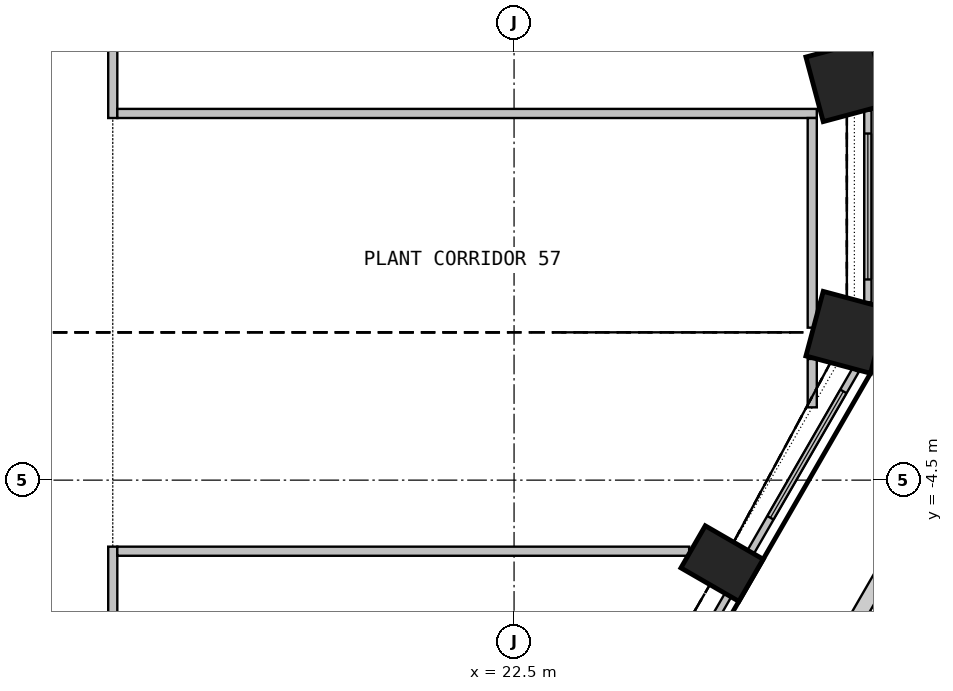
"""IFC4 building model, lengths in metres.
Left out: names, types, materials, properties, quantities, classifications, styles, units other than length and angle.
Written with IfcOpenShell. Run it as: python <this file> out.ifc"""

import sys

from ifc_helpers import new_model, si_unit, direction, frame, frame_2d, origin, origin_2d, place, context, subcontext, project, spatial, polyline, rectangle, outline, extrude, element, fill, save


model = new_model("IFC4")
c1 = context("Model", 3, precision=1e-05, world=origin(), true_north=direction((0.0, 1.0)))
c2 = subcontext(c1, "Body", "Model", "MODEL_VIEW")
j1 = project(units=[si_unit("LENGTHUNIT", "METRE"), si_unit("PLANEANGLEUNIT", "RADIAN")], contexts=[c1])
p1 = place(None, origin())
s1 = spatial("IfcSite", under=j1, at=p1, CompositionType="ELEMENT")
p2 = place(p1, origin())
s2 = spatial("IfcBuilding", under=s1, at=p2, CompositionType="ELEMENT")
p3 = place(p2, frame((0.0, 0.0, 230.7)))
s3 = spatial("IfcBuildingStorey", under=s2, at=p3, CompositionType="ELEMENT", Elevation=230.7)
p4 = place(p3, frame((25.921, -5.872, 0.0), z_axis=(0.0, 0.0, 1.0), x_axis=(0.5, 0.866025403784, 0.0)))
e1 = element("IfcColumn", 1, at=p4, inside=s3, PredefinedType="COLUMN", context=c2, shape_type="SweptSolid", body=[
    extrude(rectangle(XDim=0.8, YDim=1.1, at=origin_2d()), origin(), (0.0, 0.0, 1.0), 4.175),
])
for number, where, z_axis, x_axis in (
    (2, (27.973, -2.07, 0.0), (0.0, 0.0, 1.0), (0.259, 0.966, 0.0)),
    (3, (27.973, 2.07, 0.0), (0.0, 0.0, 1.0), (-0.259, 0.966, 0.0)),
):
    element("IfcColumn", number, at=place(p3, frame(where, z_axis=z_axis, x_axis=x_axis)), inside=s3, PredefinedType="COLUMN", context=c2, shape_type="SweptSolid", body=[
        extrude(rectangle(XDim=1.1, YDim=1.1, at=origin_2d()), origin(), (0.0, 0.0, 1.0), 4.175),
    ])
p5 = place(p3, frame((24.17, -9.595, 0.0), z_axis=(0.0, 0.0, 1.0), x_axis=(0.500029062817, 0.866008623709, 0.0)))
e4 = element("IfcWall", 4, at=p5, inside=s3, PredefinedType="SOLIDWALL", context=c2, shape_type="SweptSolid", body=[
    extrude(rectangle(XDim=3.699, YDim=0.12, at=frame_2d((1.85, 0.0))), origin(), (0.0, 0.0, 1.0), 4.175),
])
p6 = place(p5, frame((0.649, 0.0, 0.6)))
e5 = element("IfcOpeningElement", 5, at=p6, cuts=e4, PredefinedType="OPENING", context=c2, shape_type="SweptSolid", body=[
    extrude(rectangle(XDim=2.4, YDim=3.0, at=frame_2d((1.2, 1.5))), frame((0.0, 0.07, 0.0), z_axis=(0.0, -1.0, 0.0), x_axis=(1.0, 0.0, 0.0)), (0.0, 0.0, 1.0), 0.14),
])
p7 = place(p3, frame((26.392, -5.681, 0.0), z_axis=(0.0, 0.0, 1.0), x_axis=(0.500020560727, 0.866013532718, 0.0)))
e6 = element("IfcWall", 6, at=p7, inside=s3, PredefinedType="SOLIDWALL", context=c2, shape_type="SweptSolid", body=[
    extrude(rectangle(XDim=3.45, YDim=0.12, at=frame_2d((1.725, 0.0))), origin(), (0.0, 0.0, 1.0), 4.175),
])
p8 = place(p7, frame((0.649, 0.0, 0.6)))
e7 = element("IfcOpeningElement", 7, at=p8, cuts=e6, PredefinedType="OPENING", context=c2, shape_type="SweptSolid", body=[
    extrude(rectangle(XDim=2.4, YDim=3.0, at=frame_2d((1.2, 1.5))), frame((0.0, 0.07, 0.0), z_axis=(0.0, -1.0, 0.0), x_axis=(1.0, 0.0, 0.0)), (0.0, 0.0, 1.0), 0.14),
])
p9 = place(p3, frame((28.319, -1.576, 0.0), z_axis=(0.0, 0.0, 1.0), x_axis=(0.0, 1.0, 0.0)))
e8 = element("IfcWall", 8, at=p9, inside=s3, PredefinedType="SOLIDWALL", context=c2, shape_type="SweptSolid", body=[
    extrude(rectangle(XDim=3.153, YDim=0.12, at=frame_2d((1.576, 0.0))), origin(), (0.0, 0.0, 1.0), 4.175),
])
p10 = place(p9, frame((0.376, 0.0, 0.6)))
e9 = element("IfcOpeningElement", 9, at=p10, cuts=e8, PredefinedType="OPENING", context=c2, shape_type="SweptSolid", body=[
    extrude(rectangle(XDim=2.4, YDim=3.0, at=frame_2d((1.2, 1.5))), frame((0.0, 0.07, 0.0), z_axis=(0.0, -1.0, 0.0), x_axis=(1.0, 0.0, 0.0)), (0.0, 0.0, 1.0), 0.14),
])
p11 = place(p3, origin())
e10 = element("IfcWall", 10, at=p11, inside=s3, PredefinedType="PARAPET", context=c2, shape_type="SweptSolid", body=[
    extrude(outline(polyline([(26.397, -10.044), (28.647, -6.147), (28.431, -6.022), (26.181, -9.919), (26.397, -10.044)])), origin(), (0.0, 0.0, 1.0), 1.1),
])
p12 = place(p3, frame((15.9, -13.575, 0.0), z_axis=(0.0, 0.0, 1.0), x_axis=(0.0, 1.0, 0.0)))
e11 = element("IfcWall", 11, at=p12, inside=s3, PredefinedType="PARTITIONING", context=c2, shape_type="SweptSolid", body=[
    extrude(rectangle(XDim=7.981, YDim=0.15, at=frame_2d((3.99, 0.0))), origin(), (0.0, 0.0, 1.0), 4.175),
])
p13 = place(p3, frame((25.38, -5.669, 0.0), z_axis=(0.0, 0.0, 1.0), x_axis=(-1.0, 0.0, 0.0)))
e12 = element("IfcWall", 12, at=p13, inside=s3, PredefinedType="PARTITIONING", context=c2, shape_type="SweptSolid", body=[
    extrude(rectangle(XDim=9.405, YDim=0.15, at=frame_2d((4.702, 0.0))), origin(), (0.0, 0.0, 1.0), 4.175),
])
p14 = place(p3, frame((15.9, 1.455, 0.0), z_axis=(0.0, 0.0, 1.0), x_axis=(0.0, 1.0, 0.0)))
e13 = element("IfcWall", 13, at=p14, inside=s3, PredefinedType="PARTITIONING", context=c2, shape_type="SweptSolid", body=[
    extrude(rectangle(XDim=12.12, YDim=0.15, at=frame_2d((6.06, 0.0))), origin(), (0.0, 0.0, 1.0), 4.175),
])
p15 = place(p3, frame((15.975, 1.53, 0.0), z_axis=(0.0, 0.0, 1.0), x_axis=(1.0, 0.0, 0.0)))
e14 = element("IfcWall", 14, at=p15, inside=s3, PredefinedType="PARTITIONING", context=c2, shape_type="SweptSolid", body=[
    extrude(rectangle(XDim=11.504, YDim=0.15, at=frame_2d((5.752, 0.0))), origin(), (0.0, 0.0, 1.0), 4.175),
])
p16 = place(p3, frame((27.404, 1.455, 0.0), z_axis=(0.0, 0.0, 1.0), x_axis=(0.0, -1.0, 0.0)))
e15 = element("IfcWall", 15, at=p16, inside=s3, PredefinedType="PARTITIONING", context=c2, shape_type="SweptSolid", body=[
    extrude(rectangle(XDim=3.448, YDim=0.15, at=frame_2d((1.724, 0.0))), origin(), (0.0, 0.0, 1.0), 4.175),
])
p17 = place(p3, frame((27.404, -2.507, 0.0), z_axis=(0.0, 0.0, 1.0), x_axis=(0.0, -1.0, 0.0)))
e16 = element("IfcWall", 16, at=p17, inside=s3, PredefinedType="PARTITIONING", context=c2, shape_type="SweptSolid", body=[
    extrude(rectangle(XDim=0.796, YDim=0.15, at=frame_2d((0.398, 0.0))), origin(), (0.0, 0.0, 1.0), 4.175),
])
p18 = place(p8, origin())
e17 = element("IfcWindow", 17, at=p18, inside=s3, PartitioningType="SINGLE_PANEL", PredefinedType="WINDOW", context=c2, shape_type="SweptSolid", body=[
    extrude(rectangle(XDim=2.4, YDim=3.0, at=frame_2d((1.2, 1.5))), frame((0.0, 0.06, 0.0), z_axis=(0.0, -1.0, 0.0), x_axis=(1.0, 0.0, 0.0)), (0.0, 0.0, 1.0), 0.02),
])
fill(e7, e17)
p19 = place(p10, origin())
e18 = element("IfcWindow", 18, at=p19, inside=s3, PartitioningType="SINGLE_PANEL", PredefinedType="WINDOW", context=c2, shape_type="SweptSolid", body=[
    extrude(rectangle(XDim=2.4, YDim=3.0, at=frame_2d((1.2, 1.5))), frame((0.0, 0.06, 0.0), z_axis=(0.0, -1.0, 0.0), x_axis=(1.0, 0.0, 0.0)), (0.0, 0.0, 1.0), 0.02),
])
fill(e9, e18)
save(model, sys.argv[1])
